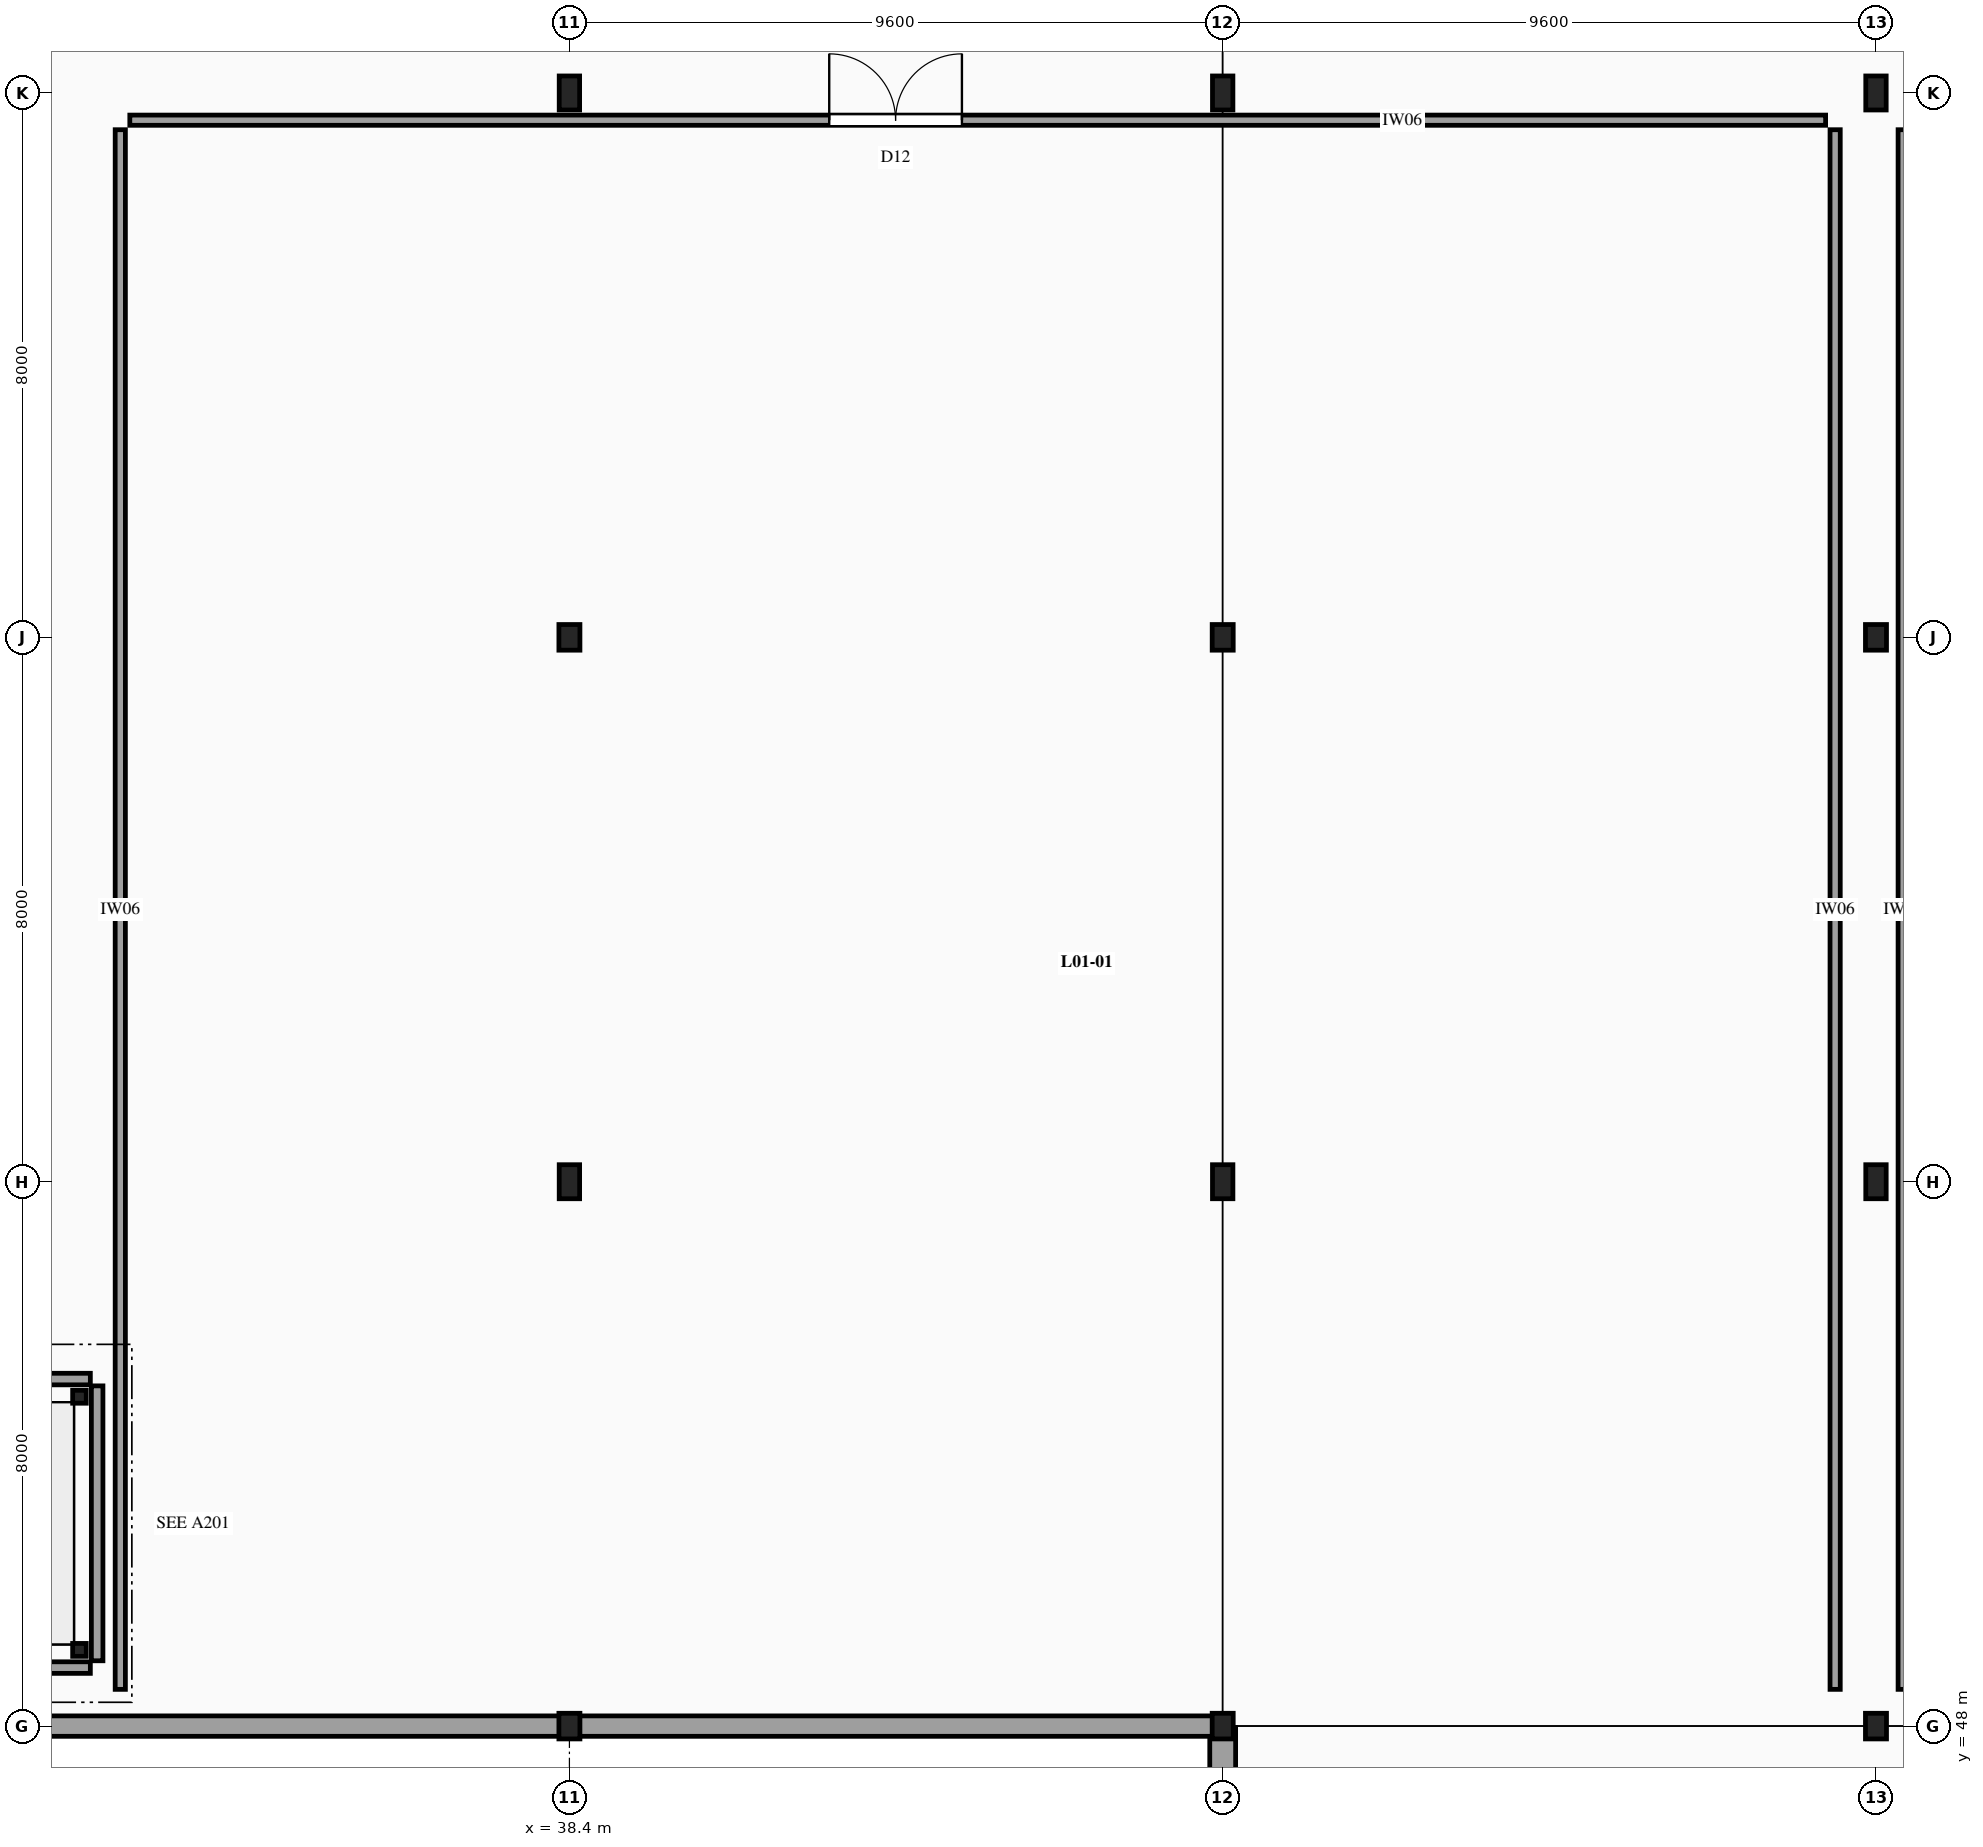
"""IFC4 building model, lengths in metres.
Left out: names, types, materials, properties, quantities, classifications, styles, units other than length and angle.
Written with IfcOpenShell. Run it as: python <this file> out.ifc"""

import sys

from ifc_helpers import new_model, si_unit, direction, frame, frame_2d, origin, origin_2d, place, context, subcontext, project, spatial, rectangle, i_section, extrude, element, fill, save


model = new_model("IFC4")
c1 = context("Model", 3, precision=1e-05, world=origin(), true_north=direction((0.0, 1.0)))
c2 = subcontext(c1, "Body", "Model", "MODEL_VIEW")
j1 = project(units=[si_unit("LENGTHUNIT", "METRE"), si_unit("PLANEANGLEUNIT", "RADIAN")], contexts=[c1])
p1 = place(None, origin())
s1 = spatial("IfcSite", under=j1, at=p1, CompositionType="ELEMENT")
p2 = place(p1, origin())
s2 = spatial("IfcBuilding", under=s1, at=p2, CompositionType="ELEMENT")
p3 = place(p2, frame((0.0, 0.0, 4.5)))
s3 = spatial("IfcBuildingStorey", under=s2, at=p3, CompositionType="ELEMENT", Elevation=4.5)
p4 = place(p3, frame((38.4, 48.0, -0.26), z_axis=(0.0, 0.0, 1.0), x_axis=(1.0, 0.0, 0.0)))
e1 = element("IfcColumn", 1, at=p4, inside=s3, PredefinedType="COLUMN", context=c2, shape_type="SweptSolid", body=[
    extrude(i_section(OverallWidth=0.309, OverallDepth=0.377, WebThickness=0.021, FlangeThickness=0.04, FilletRadius=0.027, at=origin_2d()), origin(), (0.0, 0.0, 1.0), 4.2),
])
p5 = place(p3, frame((38.4, 56.0, -0.26), z_axis=(0.0, 0.0, 1.0), x_axis=(1.0, 0.0, 0.0)))
e2 = element("IfcColumn", 2, at=p5, inside=s3, PredefinedType="COLUMN", context=c2, shape_type="SweptSolid", body=[
    extrude(i_section(OverallWidth=0.3, OverallDepth=0.5, WebThickness=0.014, FlangeThickness=0.028, FilletRadius=0.027, at=origin_2d()), origin(), (0.0, 0.0, 1.0), 4.2),
])
p6 = place(p3, frame((38.4, 64.0, -0.26), z_axis=(0.0, 0.0, 1.0), x_axis=(1.0, 0.0, 0.0)))
e3 = element("IfcColumn", 3, at=p6, inside=s3, PredefinedType="COLUMN", context=c2, shape_type="SweptSolid", body=[
    extrude(i_section(OverallWidth=0.309, OverallDepth=0.377, WebThickness=0.021, FlangeThickness=0.04, FilletRadius=0.027, at=origin_2d()), origin(), (0.0, 0.0, 1.0), 4.2),
])
p7 = place(p3, frame((38.4, 72.0, -0.26), z_axis=(0.0, 0.0, 1.0), x_axis=(1.0, 0.0, 0.0)))
e4 = element("IfcColumn", 4, at=p7, inside=s3, PredefinedType="COLUMN", context=c2, shape_type="SweptSolid", body=[
    extrude(i_section(OverallWidth=0.3, OverallDepth=0.5, WebThickness=0.014, FlangeThickness=0.028, FilletRadius=0.027, at=origin_2d()), origin(), (0.0, 0.0, 1.0), 4.2),
])
p8 = place(p3, frame((48.0, 48.0, -0.26), z_axis=(0.0, 0.0, 1.0), x_axis=(1.0, 0.0, 0.0)))
e5 = element("IfcColumn", 5, at=p8, inside=s3, PredefinedType="COLUMN", context=c2, shape_type="SweptSolid", body=[
    extrude(i_section(OverallWidth=0.309, OverallDepth=0.377, WebThickness=0.021, FlangeThickness=0.04, FilletRadius=0.027, at=origin_2d()), origin(), (0.0, 0.0, 1.0), 4.2),
])
p9 = place(p3, frame((48.0, 56.0, -0.26), z_axis=(0.0, 0.0, 1.0), x_axis=(1.0, 0.0, 0.0)))
e6 = element("IfcColumn", 6, at=p9, inside=s3, PredefinedType="COLUMN", context=c2, shape_type="SweptSolid", body=[
    extrude(i_section(OverallWidth=0.3, OverallDepth=0.5, WebThickness=0.014, FlangeThickness=0.028, FilletRadius=0.027, at=origin_2d()), origin(), (0.0, 0.0, 1.0), 4.2),
])
p10 = place(p3, frame((48.0, 64.0, -0.26), z_axis=(0.0, 0.0, 1.0), x_axis=(1.0, 0.0, 0.0)))
e7 = element("IfcColumn", 7, at=p10, inside=s3, PredefinedType="COLUMN", context=c2, shape_type="SweptSolid", body=[
    extrude(i_section(OverallWidth=0.309, OverallDepth=0.377, WebThickness=0.021, FlangeThickness=0.04, FilletRadius=0.027, at=origin_2d()), origin(), (0.0, 0.0, 1.0), 4.2),
])
p11 = place(p3, frame((48.0, 72.0, -0.26), z_axis=(0.0, 0.0, 1.0), x_axis=(1.0, 0.0, 0.0)))
e8 = element("IfcColumn", 8, at=p11, inside=s3, PredefinedType="COLUMN", context=c2, shape_type="SweptSolid", body=[
    extrude(i_section(OverallWidth=0.3, OverallDepth=0.5, WebThickness=0.014, FlangeThickness=0.028, FilletRadius=0.027, at=origin_2d()), origin(), (0.0, 0.0, 1.0), 4.2),
])
p12 = place(p3, frame((57.6, 48.0, -0.26), z_axis=(0.0, 0.0, 1.0), x_axis=(1.0, 0.0, 0.0)))
e9 = element("IfcColumn", 9, at=p12, inside=s3, PredefinedType="COLUMN", context=c2, shape_type="SweptSolid", body=[
    extrude(i_section(OverallWidth=0.309, OverallDepth=0.377, WebThickness=0.021, FlangeThickness=0.04, FilletRadius=0.027, at=origin_2d()), origin(), (0.0, 0.0, 1.0), 4.2),
])
p13 = place(p3, frame((57.6, 56.0, -0.26), z_axis=(0.0, 0.0, 1.0), x_axis=(1.0, 0.0, 0.0)))
e10 = element("IfcColumn", 10, at=p13, inside=s3, PredefinedType="COLUMN", context=c2, shape_type="SweptSolid", body=[
    extrude(i_section(OverallWidth=0.3, OverallDepth=0.5, WebThickness=0.014, FlangeThickness=0.028, FilletRadius=0.027, at=origin_2d()), origin(), (0.0, 0.0, 1.0), 4.2),
])
p14 = place(p3, frame((57.6, 64.0, -0.26), z_axis=(0.0, 0.0, 1.0), x_axis=(1.0, 0.0, 0.0)))
e11 = element("IfcColumn", 11, at=p14, inside=s3, PredefinedType="COLUMN", context=c2, shape_type="SweptSolid", body=[
    extrude(i_section(OverallWidth=0.309, OverallDepth=0.377, WebThickness=0.021, FlangeThickness=0.04, FilletRadius=0.027, at=origin_2d()), origin(), (0.0, 0.0, 1.0), 4.2),
])
p15 = place(p3, frame((57.6, 72.0, -0.26), z_axis=(0.0, 0.0, 1.0), x_axis=(1.0, 0.0, 0.0)))
e12 = element("IfcColumn", 12, at=p15, inside=s3, PredefinedType="COLUMN", context=c2, shape_type="SweptSolid", body=[
    extrude(i_section(OverallWidth=0.3, OverallDepth=0.5, WebThickness=0.014, FlangeThickness=0.028, FilletRadius=0.027, at=origin_2d()), origin(), (0.0, 0.0, 1.0), 4.2),
])
for number, where, z_axis, x_axis in (
    (13, (31.2, 49.12, 0.0), (0.0, 0.0, 1.0), (1.0, 0.0, 0.0)),
    (14, (31.2, 52.84, 0.0), (0.0, 0.0, 1.0), (1.0, 0.0, 0.0)),
):
    element("IfcColumn", number, at=place(p3, frame(where, z_axis=z_axis, x_axis=x_axis)), inside=s3, PredefinedType="COLUMN", context=c2, shape_type="SweptSolid", body=[
        extrude(i_section(OverallWidth=0.2, OverallDepth=0.19, WebThickness=0.007, FlangeThickness=0.01, FilletRadius=0.018, at=origin_2d()), origin(), (0.0, 0.0, 1.0), 4.2),
    ])
p16 = place(p3, frame((48.0, 40.02, 0.0), z_axis=(0.0, 0.0, 1.0), x_axis=(0.0, 1.0, 0.0)))
e15 = element("IfcWall", 15, at=p16, inside=s3, PredefinedType="SOLIDWALL", context=c2, shape_type="SweptSolid", body=[
    extrude(rectangle(XDim=7.96, YDim=0.38, at=frame_2d((3.98, 0.0))), origin(), (0.0, 0.0, 1.0), 3.26),
])
p17 = place(p16, frame((2.85, 0.0, 0.72)))
e16 = element("IfcOpeningElement", 16, at=p17, cuts=e15, PredefinedType="OPENING", context=c2, shape_type="SweptSolid", body=[
    extrude(rectangle(XDim=1.35, YDim=1.7, at=frame_2d((0.675, 0.85))), frame((0.0, 0.2, 0.0), z_axis=(0.0, -1.0, 0.0), x_axis=(1.0, 0.0, 0.0)), (0.0, 0.0, 1.0), 0.4),
])
p18 = place(p3, frame((28.82, 48.0, 0.0), z_axis=(0.0, 0.0, 1.0), x_axis=(1.0, 0.0, 0.0)))
e17 = element("IfcWall", 17, at=p18, inside=s3, PredefinedType="SOLIDWALL", context=c2, shape_type="SweptSolid", body=[
    extrude(rectangle(XDim=9.56, YDim=0.3, at=frame_2d((4.78, 0.0))), origin(), (0.0, 0.0, 1.0), 3.26),
])
p19 = place(p3, frame((38.42, 48.0, 0.0), z_axis=(0.0, 0.0, 1.0), x_axis=(1.0, 0.0, 0.0)))
e18 = element("IfcWall", 18, at=p19, inside=s3, PredefinedType="SOLIDWALL", context=c2, shape_type="SweptSolid", body=[
    extrude(rectangle(XDim=9.56, YDim=0.3, at=frame_2d((4.78, 0.0))), origin(), (0.0, 0.0, 1.0), 3.26),
])
p20 = place(p3, frame((31.46, 48.96, 0.0), z_axis=(0.0, 0.0, 1.0), x_axis=(0.0, 1.0, 0.0)))
e19 = element("IfcWall", 19, at=p20, inside=s3, PredefinedType="SOLIDWALL", context=c2, shape_type="SweptSolid", body=[
    extrude(rectangle(XDim=4.04, YDim=0.17, at=frame_2d((2.02, 0.0))), origin(), (0.0, 0.0, 1.0), 3.1),
])
for number, where, z_axis, x_axis in (
    (20, (21.36, 48.86, 0.0), (0.0, 0.0, 1.0), (1.0, 0.0, 0.0)),
    (21, (21.36, 53.1, 0.0), (0.0, 0.0, 1.0), (1.0, 0.0, 0.0)),
):
    element("IfcWall", number, at=place(p3, frame(where, z_axis=z_axis, x_axis=x_axis)), inside=s3, PredefinedType="SOLIDWALL", context=c2, shape_type="SweptSolid", body=[
        extrude(rectangle(XDim=10.0, YDim=0.17, at=frame_2d((5.0, 0.0))), origin(), (0.0, 0.0, 1.0), 3.1),
    ])
p21 = place(p3, frame((31.94, 71.6, 0.0), z_axis=(0.0, 0.0, 1.0), x_axis=(1.0, 0.0, 0.0)))
e22 = element("IfcWall", 22, at=p21, inside=s3, PredefinedType="PARTITIONING", context=c2, shape_type="SweptSolid", body=[
    extrude(rectangle(XDim=24.92, YDim=0.15, at=frame_2d((12.46, 0.0))), origin(), (0.0, 0.0, 1.0), 3.1),
])
p22 = place(p21, frame((10.278, 0.0, 0.0)))
e23 = element("IfcOpeningElement", 23, at=p22, cuts=e22, PredefinedType="OPENING", context=c2, shape_type="SweptSolid", body=[
    extrude(rectangle(XDim=1.95, YDim=2.55, at=frame_2d((0.975, 1.275))), frame((0.0, 0.085, 0.0), z_axis=(0.0, -1.0, 0.0), x_axis=(1.0, 0.0, 0.0)), (0.0, 0.0, 1.0), 0.17),
])
for number, where, z_axis, x_axis in (
    (24, (31.8, 48.54, 0.0), (0.0, 0.0, 1.0), (0.0, 1.0, 0.0)),
    (25, (57.0, 48.54, 0.0), (0.0, 0.0, 1.0), (0.0, 1.0, 0.0)),
    (26, (58.0, 48.54, 0.0), (0.0, 0.0, 1.0), (0.0, 1.0, 0.0)),
):
    element("IfcWall", number, at=place(p3, frame(where, z_axis=z_axis, x_axis=x_axis)), inside=s3, PredefinedType="PARTITIONING", context=c2, shape_type="SweptSolid", body=[
        extrude(rectangle(XDim=22.92, YDim=0.15, at=frame_2d((11.46, 0.0))), origin(), (0.0, 0.0, 1.0), 3.1),
    ])
p23 = place(p22, origin())
e27 = element("IfcDoor", 27, at=p23, inside=s3, OperationType="DOUBLE_DOOR_SINGLE_SWING", PredefinedType="DOOR", context=c2, shape_type="SweptSolid", body=[
    extrude(rectangle(XDim=1.95, YDim=2.55, at=frame_2d((0.975, 1.275))), frame((0.0, 0.025, 0.0), z_axis=(0.0, -1.0, 0.0), x_axis=(1.0, 0.0, 0.0)), (0.0, 0.0, 1.0), 0.05),
])
fill(e23, e27)
save(model, sys.argv[1])
